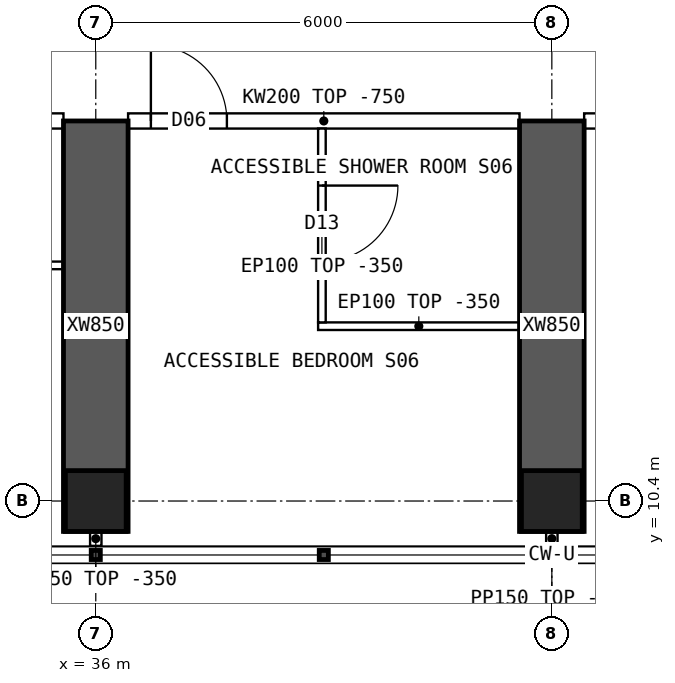
"""IFC4 building model, lengths in metres.
Left out: names, types, materials, properties, quantities, classifications, styles, units other than length and angle.
Written with IfcOpenShell. Run it as: python <this file> out.ifc"""

import sys

from ifc_helpers import new_model, si_unit, direction, frame, frame_2d, origin, origin_2d, place, context, subcontext, project, spatial, polyline, rectangle, hollow_rectangle, outline, extrude, element, fill, save


model = new_model("IFC4")
c1 = context("Model", 3, precision=1e-05, world=origin(), true_north=direction((0.0, 1.0)))
c2 = subcontext(c1, "Body", "Model", "MODEL_VIEW")
j1 = project(units=[si_unit("LENGTHUNIT", "METRE"), si_unit("PLANEANGLEUNIT", "RADIAN")], contexts=[c1])
p1 = place(None, origin())
s1 = spatial("IfcSite", under=j1, at=p1, CompositionType="ELEMENT")
p2 = place(p1, origin())
s2 = spatial("IfcBuilding", under=s1, at=p2, CompositionType="ELEMENT")
p3 = place(p2, frame((0.0, 0.0, 197.35)))
s3 = spatial("IfcBuildingStorey", under=s2, at=p3, CompositionType="ELEMENT", Elevation=197.35)
for number, where, z_axis, x_axis in (
    (1, (36.0, 10.4, 0.0), (0.0, 0.0, 1.0), (1.0, 0.0, 0.0)),
    (2, (42.0, 10.4, 0.0), (0.0, 0.0, 1.0), (1.0, 0.0, 0.0)),
):
    element("IfcColumn", number, at=place(p3, frame(where, z_axis=z_axis, x_axis=x_axis)), inside=s3, PredefinedType="COLUMN", context=c2, shape_type="SweptSolid", body=[
        extrude(hollow_rectangle(XDim=0.8, YDim=0.8, WallThickness=0.08, at=origin_2d()), origin(), (0.0, 0.0, 1.0), 3.75),
    ])
for number, where, z_axis, x_axis in (
    (3, (36.0, 10.0, 0.0), (0.0, 0.0, 1.0), (0.0, 1.0, 0.0)),
    (4, (42.0, 10.0, 0.0), (0.0, 0.0, 1.0), (0.0, 1.0, 0.0)),
):
    element("IfcWall", number, at=place(p3, frame(where, z_axis=z_axis, x_axis=x_axis)), inside=s3, PredefinedType="SHEAR", context=c2, shape_type="SweptSolid", body=[
        extrude(rectangle(XDim=5.4, YDim=0.85, at=frame_2d((2.7, 0.0))), origin(), (0.0, 0.0, 1.0), 3.75),
    ])
p4 = place(p3, frame((30.425, 15.4, 0.0), z_axis=(0.0, 0.0, 1.0), x_axis=(1.0, 0.0, 0.0)))
e5 = element("IfcWall", 5, at=p4, inside=s3, PredefinedType="SOLIDWALL", context=c2, shape_type="SweptSolid", body=[
    extrude(outline(polyline([(0.0, 0.0), (5.15, 0.0), (5.15, 3.0), (0.0, 3.0), (0.0, 0.0)])), frame((0.0, 0.1, 0.0), z_axis=(0.0, -1.0, 0.0), x_axis=(1.0, 0.0, 0.0)), (0.0, 0.0, 1.0), 0.2),
])
p5 = place(p4, frame((0.1, 0.0, 0.0)))
e6 = element("IfcOpeningElement", 6, at=p5, cuts=e5, PredefinedType="OPENING", context=c2, shape_type="SweptSolid", body=[
    extrude(rectangle(XDim=0.9, YDim=2.1, at=frame_2d((0.45, 1.05))), frame((0.0, 0.11, 0.0), z_axis=(0.0, -1.0, 0.0), x_axis=(1.0, 0.0, 0.0)), (0.0, 0.0, 1.0), 0.22),
])
p6 = place(p3, frame((36.425, 15.4, 0.0), z_axis=(0.0, 0.0, 1.0), x_axis=(1.0, 0.0, 0.0)))
e7 = element("IfcWall", 7, at=p6, inside=s3, PredefinedType="SOLIDWALL", context=c2, shape_type="SweptSolid", body=[
    extrude(outline(polyline([(0.0, 0.0), (5.15, 0.0), (5.15, 3.0), (0.0, 3.0), (0.0, 0.0)])), frame((0.0, 0.1, 0.0), z_axis=(0.0, -1.0, 0.0), x_axis=(1.0, 0.0, 0.0)), (0.0, 0.0, 1.0), 0.2),
])
p7 = place(p6, frame((0.3, 0.0, 0.0)))
e8 = element("IfcOpeningElement", 8, at=p7, cuts=e7, PredefinedType="OPENING", context=c2, shape_type="SweptSolid", body=[
    extrude(rectangle(XDim=1.0, YDim=2.1, at=frame_2d((0.5, 1.05))), frame((0.0, 0.11, 0.0), z_axis=(0.0, -1.0, 0.0), x_axis=(1.0, 0.0, 0.0)), (0.0, 0.0, 1.0), 0.22),
])
p8 = place(p3, frame((42.425, 15.4, 0.0), z_axis=(0.0, 0.0, 1.0), x_axis=(1.0, 0.0, 0.0)))
e9 = element("IfcWall", 9, at=p8, inside=s3, PredefinedType="SOLIDWALL", context=c2, shape_type="SweptSolid", body=[
    extrude(outline(polyline([(0.0, 0.0), (5.15, 0.0), (5.15, 3.0), (0.0, 3.0), (0.0, 0.0)])), frame((0.0, 0.1, 0.0), z_axis=(0.0, -1.0, 0.0), x_axis=(1.0, 0.0, 0.0)), (0.0, 0.0, 1.0), 0.2),
])
p9 = place(p8, frame((0.6, 0.0, 0.0)))
e10 = element("IfcOpeningElement", 10, at=p9, cuts=e9, PredefinedType="OPENING", context=c2, shape_type="SweptSolid", body=[
    extrude(rectangle(XDim=1.0, YDim=2.1, at=frame_2d((0.5, 1.05))), frame((0.0, 0.11, 0.0), z_axis=(0.0, -1.0, 0.0), x_axis=(1.0, 0.0, 0.0)), (0.0, 0.0, 1.0), 0.22),
])
p10 = place(p3, frame((35.575, 13.5, 0.0), z_axis=(0.0, 0.0, 1.0), x_axis=(-1.0, 0.0, 0.0)))
e11 = element("IfcWall", 11, at=p10, inside=s3, PredefinedType="PARTITIONING", context=c2, shape_type="SweptSolid", body=[
    extrude(rectangle(XDim=2.55, YDim=0.1, at=frame_2d((1.275, 0.0))), origin(), (0.0, 0.0, 1.0), 3.4),
])
p11 = place(p10, frame((0.825, 0.0, 0.0)))
e12 = element("IfcOpeningElement", 12, at=p11, cuts=e11, PredefinedType="OPENING", context=c2, shape_type="SweptSolid", body=[
    extrude(rectangle(XDim=0.9, YDim=2.1, at=frame_2d((0.45, 1.05))), frame((0.0, 0.06, 0.0), z_axis=(0.0, -1.0, 0.0), x_axis=(1.0, 0.0, 0.0)), (0.0, 0.0, 1.0), 0.12),
])
p12 = place(p3, frame((38.925, 12.7, 0.0), z_axis=(0.0, 0.0, 1.0), x_axis=(1.0, 0.0, 0.0)))
e13 = element("IfcWall", 13, at=p12, inside=s3, PredefinedType="PARTITIONING", context=c2, shape_type="SweptSolid", body=[
    extrude(rectangle(XDim=2.65, YDim=0.1, at=frame_2d((1.325, 0.0))), origin(), (0.0, 0.0, 1.0), 3.4),
])
p13 = place(p3, frame((38.975, 12.75, 0.0), z_axis=(0.0, 0.0, 1.0), x_axis=(0.0, 1.0, 0.0)))
e14 = element("IfcWall", 14, at=p13, inside=s3, PredefinedType="PARTITIONING", context=c2, shape_type="SweptSolid", body=[
    extrude(outline(polyline([(0.0, 0.0), (2.55, 0.0), (2.55, 3.0), (2.502, 3.0), (2.5, 3.4), (0.0, 3.4), (0.0, 0.0)])), frame((0.0, 0.05, 0.0), z_axis=(0.0, -1.0, 0.0), x_axis=(1.0, 0.0, 0.0)), (0.0, 0.0, 1.0), 0.1),
])
p14 = place(p13, frame((0.8, 0.0, 0.0)))
e15 = element("IfcOpeningElement", 15, at=p14, cuts=e14, PredefinedType="OPENING", context=c2, shape_type="SweptSolid", body=[
    extrude(rectangle(XDim=1.0, YDim=2.1, at=frame_2d((0.5, 1.05))), frame((0.0, 0.06, 0.0), z_axis=(0.0, -1.0, 0.0), x_axis=(1.0, 0.0, 0.0)), (0.0, 0.0, 1.0), 0.12),
])
for number, where, z_axis, x_axis in (
    (16, (36.0, 10.0, 0.0), (0.0, 0.0, 1.0), (0.0, -1.0, 0.0)),
    (17, (42.0, 10.0, 0.0), (0.0, 0.0, 1.0), (0.0, -1.0, 0.0)),
):
    element("IfcWall", number, at=place(p3, frame(where, z_axis=z_axis, x_axis=x_axis)), inside=s3, PredefinedType="PARTITIONING", context=c2, shape_type="SweptSolid", body=[
        extrude(rectangle(XDim=0.19, YDim=0.15, at=frame_2d((0.095, 0.0))), origin(), (0.0, 0.0, 1.0), 3.4),
    ])
p15 = place(p14, origin())
e18 = element("IfcDoor", 18, at=p15, inside=s3, OperationType="SINGLE_SWING_RIGHT", PredefinedType="DOOR", context=c2, shape_type="SweptSolid", body=[
    extrude(rectangle(XDim=1.0, YDim=2.1, at=frame_2d((0.5, 1.05))), frame((0.0, 0.025, 0.0), z_axis=(0.0, -1.0, 0.0), x_axis=(1.0, 0.0, 0.0)), (0.0, 0.0, 1.0), 0.05),
])
fill(e15, e18)
p16 = place(p7, origin())
e19 = element("IfcDoor", 19, at=p16, inside=s3, OperationType="SINGLE_SWING_LEFT", PredefinedType="DOOR", context=c2, shape_type="SweptSolid", body=[
    extrude(rectangle(XDim=1.0, YDim=2.1, at=frame_2d((0.5, 1.05))), frame((0.0, 0.025, 0.0), z_axis=(0.0, -1.0, 0.0), x_axis=(1.0, 0.0, 0.0)), (0.0, 0.0, 1.0), 0.05),
])
fill(e8, e19)
save(model, sys.argv[1])
